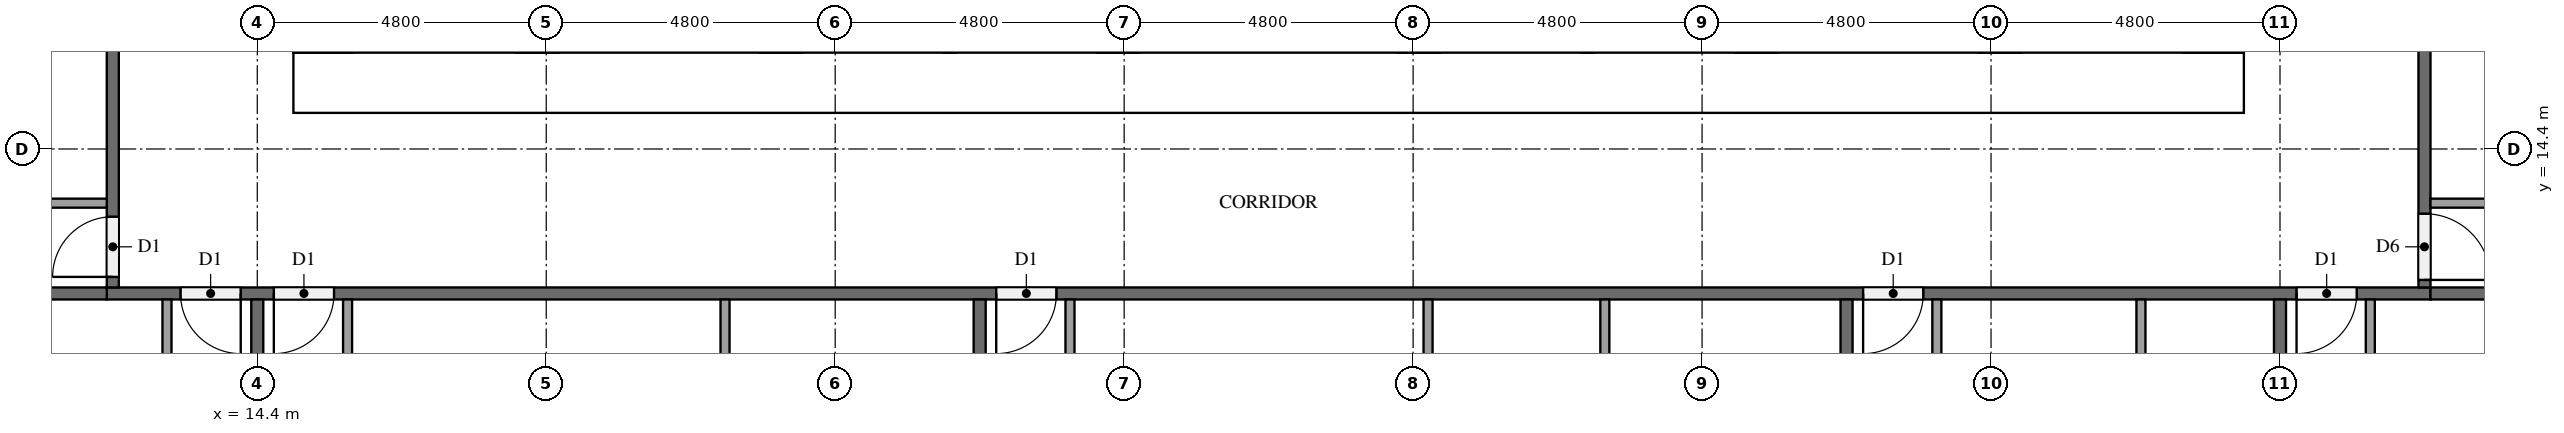
"""IFC4 building model, lengths in metres.
Left out: names, types, materials, properties, quantities, classifications, styles, units other than length and angle.
Written with IfcOpenShell. Run it as: python <this file> out.ifc"""

import sys

from ifc_helpers import new_model, si_unit, direction, frame, frame_2d, origin, place, context, subcontext, project, spatial, rectangle, extrude, element, fill, save


model = new_model("IFC4")
c1 = context("Model", 3, precision=1e-05, world=origin(), true_north=direction((0.0, 1.0)))
c2 = subcontext(c1, "Body", "Model", "MODEL_VIEW")
j1 = project(units=[si_unit("LENGTHUNIT", "METRE"), si_unit("PLANEANGLEUNIT", "RADIAN")], contexts=[c1])
p1 = place(None, origin())
s1 = spatial("IfcSite", under=j1, at=p1, CompositionType="ELEMENT")
p2 = place(p1, origin())
s2 = spatial("IfcBuilding", under=s1, at=p2, CompositionType="ELEMENT")
p3 = place(p2, frame((0.0, 0.0, 36.4)))
s3 = spatial("IfcBuildingStorey", under=s2, at=p3, CompositionType="ELEMENT", Elevation=36.4)
p4 = place(p3, frame((15.0, 15.5, 0.0), z_axis=(0.0, 0.0, 1.0), x_axis=(1.0, 0.0, 0.0)))
e1 = element("IfcWall", 1, at=p4, inside=s3, PredefinedType="SHEAR", context=c2, shape_type="SweptSolid", body=[
    extrude(rectangle(XDim=32.4, YDim=1.0, at=frame_2d((16.2, 0.0))), origin(), (0.0, 0.0, 1.0), 3.2),
])
p5 = place(p4, frame((15.3, 0.0, 0.0)))
e2 = element("IfcOpeningElement", 2, at=p5, cuts=e1, PredefinedType="OPENING", context=c2, shape_type="SweptSolid", body=[
    extrude(rectangle(XDim=1.8, YDim=2.1, at=frame_2d((0.9, 1.05))), frame((0.0, 0.51, 0.0), z_axis=(0.0, -1.0, 0.0), x_axis=(1.0, 0.0, 0.0)), (0.0, 0.0, 1.0), 1.02),
])
p6 = place(p3, frame((15.5, 16.0, 0.0), z_axis=(0.0, 0.0, 1.0), x_axis=(0.0, 1.0, 0.0)))
e3 = element("IfcWall", 3, at=p6, inside=s3, PredefinedType="SHEAR", context=c2, shape_type="SweptSolid", body=[
    extrude(rectangle(XDim=20.8, YDim=1.0, at=frame_2d((10.4, 0.0))), origin(), (0.0, 0.0, 1.0), 3.2),
])
p7 = place(p6, frame((4.76, 0.0, 0.0)))
e4 = element("IfcOpeningElement", 4, at=p7, cuts=e3, PredefinedType="OPENING", context=c2, shape_type="SweptSolid", body=[
    extrude(rectangle(XDim=1.2, YDim=2.1, at=frame_2d((0.6, 1.05))), frame((0.0, 0.51, 0.0), z_axis=(0.0, -1.0, 0.0), x_axis=(1.0, 0.0, 0.0)), (0.0, 0.0, 1.0), 1.02),
])
p8 = place(p3, frame((46.9, 16.0, 0.0), z_axis=(0.0, 0.0, 1.0), x_axis=(0.0, 1.0, 0.0)))
e5 = element("IfcWall", 5, at=p8, inside=s3, PredefinedType="SHEAR", context=c2, shape_type="SweptSolid", body=[
    extrude(rectangle(XDim=20.8, YDim=1.0, at=frame_2d((10.4, 0.0))), origin(), (0.0, 0.0, 1.0), 3.2),
])
p9 = place(p8, frame((10.1, 0.0, 0.0)))
e6 = element("IfcOpeningElement", 6, at=p9, cuts=e5, PredefinedType="OPENING", context=c2, shape_type="SweptSolid", body=[
    extrude(rectangle(XDim=1.2, YDim=2.1, at=frame_2d((0.6, 1.05))), frame((0.0, 0.51, 0.0), z_axis=(0.0, -1.0, 0.0), x_axis=(1.0, 0.0, 0.0)), (0.0, 0.0, 1.0), 1.02),
])
p10 = place(p3, frame((23.1, 16.0, 0.0), z_axis=(0.0, 0.0, 1.0), x_axis=(0.0, 1.0, 0.0)))
e7 = element("IfcWall", 7, at=p10, inside=s3, PredefinedType="SHEAR", context=c2, shape_type="SweptSolid", body=[
    extrude(rectangle(XDim=20.8, YDim=0.7, at=frame_2d((10.4, 0.0))), origin(), (0.0, 0.0, 1.0), 3.2),
])
p11 = place(p3, frame((50.5, 12.0, 0.0), z_axis=(0.0, 0.0, 1.0), x_axis=(-1.0, 0.0, 0.0)))
e8 = element("IfcWall", 8, at=p11, inside=s3, PredefinedType="PARTITIONING", context=c2, shape_type="SweptSolid", body=[
    extrude(rectangle(XDim=38.6, YDim=0.2, at=frame_2d((19.3, 0.0))), origin(), (0.0, 0.0, 1.0), 3.2),
])
p12 = place(p11, frame((36.375, 0.0, 0.0)))
e9 = element("IfcOpeningElement", 9, at=p12, cuts=e8, PredefinedType="OPENING", context=c2, shape_type="SweptSolid", body=[
    extrude(rectangle(XDim=1.0, YDim=2.1, at=frame_2d((0.5, 1.05))), frame((0.0, 0.11, 0.0), z_axis=(0.0, -1.0, 0.0), x_axis=(1.0, 0.0, 0.0)), (0.0, 0.0, 1.0), 0.22),
])
p13 = place(p11, frame((34.825, 0.0, 0.0)))
e10 = element("IfcOpeningElement", 10, at=p13, cuts=e8, PredefinedType="OPENING", context=c2, shape_type="SweptSolid", body=[
    extrude(rectangle(XDim=1.0, YDim=2.1, at=frame_2d((0.5, 1.05))), frame((0.0, 0.11, 0.0), z_axis=(0.0, -1.0, 0.0), x_axis=(1.0, 0.0, 0.0)), (0.0, 0.0, 1.0), 0.22),
])
p14 = place(p11, frame((22.825, 0.0, 0.0)))
e11 = element("IfcOpeningElement", 11, at=p14, cuts=e8, PredefinedType="OPENING", context=c2, shape_type="SweptSolid", body=[
    extrude(rectangle(XDim=1.0, YDim=2.1, at=frame_2d((0.5, 1.05))), frame((0.0, 0.11, 0.0), z_axis=(0.0, -1.0, 0.0), x_axis=(1.0, 0.0, 0.0)), (0.0, 0.0, 1.0), 0.22),
])
p15 = place(p11, frame((8.425, 0.0, 0.0)))
e12 = element("IfcOpeningElement", 12, at=p15, cuts=e8, PredefinedType="OPENING", context=c2, shape_type="SweptSolid", body=[
    extrude(rectangle(XDim=1.0, YDim=2.1, at=frame_2d((0.5, 1.05))), frame((0.0, 0.11, 0.0), z_axis=(0.0, -1.0, 0.0), x_axis=(1.0, 0.0, 0.0)), (0.0, 0.0, 1.0), 0.22),
])
p16 = place(p11, frame((1.225, 0.0, 0.0)))
e13 = element("IfcOpeningElement", 13, at=p16, cuts=e8, PredefinedType="OPENING", context=c2, shape_type="SweptSolid", body=[
    extrude(rectangle(XDim=1.0, YDim=2.1, at=frame_2d((0.5, 1.05))), frame((0.0, 0.11, 0.0), z_axis=(0.0, -1.0, 0.0), x_axis=(1.0, 0.0, 0.0)), (0.0, 0.0, 1.0), 0.22),
])
p17 = place(p3, frame((50.4, 40.7, 0.0), z_axis=(0.0, 0.0, 1.0), x_axis=(0.0, -1.0, 0.0)))
e14 = element("IfcWall", 14, at=p17, inside=s3, PredefinedType="PARTITIONING", context=c2, shape_type="SweptSolid", body=[
    extrude(rectangle(XDim=28.6, YDim=0.2, at=frame_2d((14.3, 0.0))), origin(), (0.0, 0.0, 1.0), 3.2),
])
p18 = place(p17, frame((27.375, 0.0, 0.0)))
e15 = element("IfcOpeningElement", 15, at=p18, cuts=e14, PredefinedType="OPENING", context=c2, shape_type="SweptSolid", body=[
    extrude(rectangle(XDim=1.1, YDim=2.1, at=frame_2d((0.55, 1.05))), frame((0.0, 0.11, 0.0), z_axis=(0.0, -1.0, 0.0), x_axis=(1.0, 0.0, 0.0)), (0.0, 0.0, 1.0), 0.22),
])
p19 = place(p17, frame((8.225, 0.0, 0.0)))
e16 = element("IfcOpeningElement", 16, at=p19, cuts=e14, PredefinedType="OPENING", context=c2, shape_type="SweptSolid", body=[
    extrude(rectangle(XDim=1.0, YDim=2.1, at=frame_2d((0.5, 1.05))), frame((0.0, 0.11, 0.0), z_axis=(0.0, -1.0, 0.0), x_axis=(1.0, 0.0, 0.0)), (0.0, 0.0, 1.0), 0.22),
])
p20 = place(p3, frame((12.0, 12.1, 0.0), z_axis=(0.0, 0.0, 1.0), x_axis=(0.0, 1.0, 0.0)))
e17 = element("IfcWall", 17, at=p20, inside=s3, PredefinedType="PARTITIONING", context=c2, shape_type="SweptSolid", body=[
    extrude(rectangle(XDim=28.6, YDim=0.2, at=frame_2d((14.3, 0.0))), origin(), (0.0, 0.0, 1.0), 3.2),
])
p21 = place(p20, frame((16.975, 0.0, 0.0)))
e18 = element("IfcOpeningElement", 18, at=p21, cuts=e17, PredefinedType="OPENING", context=c2, shape_type="SweptSolid", body=[
    extrude(rectangle(XDim=1.0, YDim=2.1, at=frame_2d((0.5, 1.05))), frame((0.0, 0.11, 0.0), z_axis=(0.0, -1.0, 0.0), x_axis=(1.0, 0.0, 0.0)), (0.0, 0.0, 1.0), 0.22),
])
p22 = place(p20, frame((0.175, 0.0, 0.0)))
e19 = element("IfcOpeningElement", 19, at=p22, cuts=e17, PredefinedType="OPENING", context=c2, shape_type="SweptSolid", body=[
    extrude(rectangle(XDim=1.0, YDim=2.1, at=frame_2d((0.5, 1.05))), frame((0.0, 0.11, 0.0), z_axis=(0.0, -1.0, 0.0), x_axis=(1.0, 0.0, 0.0)), (0.0, 0.0, 1.0), 0.22),
])
p23 = place(p3, frame((14.4, 11.9, 0.0), z_axis=(0.0, 0.0, 1.0), x_axis=(0.0, -1.0, 0.0)))
e20 = element("IfcWall", 20, at=p23, inside=s3, PredefinedType="PARTITIONING", context=c2, shape_type="SweptSolid", body=[
    extrude(rectangle(XDim=11.45, YDim=0.2, at=frame_2d((5.725, 0.0))), origin(), (0.0, 0.0, 1.0), 3.2),
])
for number, where, z_axis, x_axis in (
    (21, (0.1, 12.0, 0.0), (0.0, 0.0, 1.0), (1.0, 0.0, 0.0)),
    (22, (26.4, 11.9, 0.0), (0.0, 0.0, 1.0), (0.0, -1.0, 0.0)),
    (23, (40.8, 11.9, 0.0), (0.0, 0.0, 1.0), (0.0, -1.0, 0.0)),
    (24, (48.0, 11.9, 0.0), (0.0, 0.0, 1.0), (0.0, -1.0, 0.0)),
):
    element("IfcWall", number, at=place(p3, frame(where, z_axis=z_axis, x_axis=x_axis)), inside=s3, PredefinedType="PARTITIONING", context=c2, shape_type="SweptSolid", body=[
        extrude(rectangle(XDim=11.8, YDim=0.2, at=frame_2d((5.9, 0.0))), origin(), (0.0, 0.0, 1.0), 3.2),
    ])
p24 = place(p3, frame((50.5, 12.0, 0.0), z_axis=(0.0, 0.0, 1.0), x_axis=(1.0, 0.0, 0.0)))
e25 = element("IfcWall", 25, at=p24, inside=s3, PredefinedType="PARTITIONING", context=c2, shape_type="SweptSolid", body=[
    extrude(rectangle(XDim=7.0, YDim=0.2, at=frame_2d((3.5, 0.0))), origin(), (0.0, 0.0, 1.0), 3.2),
])
p25 = place(p3, frame((12.9, 11.9, 0.0), z_axis=(0.0, 0.0, 1.0), x_axis=(0.0, -1.0, 0.0)))
e26 = element("IfcWall", 26, at=p25, inside=s3, PredefinedType="PARTITIONING", context=c2, shape_type="SweptSolid", body=[
    extrude(rectangle(XDim=3.125, YDim=0.15, at=frame_2d((1.562, 0.0))), origin(), (0.0, 0.0, 1.0), 3.2),
])
p26 = place(p3, frame((22.17, 11.9, 0.0), z_axis=(0.0, 0.0, 1.0), x_axis=(0.0, -1.0, 0.0)))
e27 = element("IfcWall", 27, at=p26, inside=s3, PredefinedType="PARTITIONING", context=c2, shape_type="SweptSolid", body=[
    extrude(rectangle(XDim=3.725, YDim=0.15, at=frame_2d((1.862, 0.0))), origin(), (0.0, 0.0, 1.0), 3.2),
])
p27 = place(p3, frame((15.9, 11.9, 0.0), z_axis=(0.0, 0.0, 1.0), x_axis=(0.0, -1.0, 0.0)))
e28 = element("IfcWall", 28, at=p27, inside=s3, PredefinedType="PARTITIONING", context=c2, shape_type="SweptSolid", body=[
    extrude(rectangle(XDim=3.875, YDim=0.15, at=frame_2d((1.938, 0.0))), origin(), (0.0, 0.0, 1.0), 3.2),
])
for number, where, z_axis, x_axis in (
    (29, (33.848, 11.9, 0.0), (0.0, 0.0, 1.0), (0.0, -1.0, 0.0)),
    (30, (36.785, 11.9, 0.0), (0.0, 0.0, 1.0), (0.0, -1.0, 0.0)),
):
    element("IfcWall", number, at=place(p3, frame(where, z_axis=z_axis, x_axis=x_axis)), inside=s3, PredefinedType="PARTITIONING", context=c2, shape_type="SweptSolid", body=[
        extrude(rectangle(XDim=3.575, YDim=0.15, at=frame_2d((1.788, 0.0))), origin(), (0.0, 0.0, 1.0), 3.2),
    ])
p28 = place(p3, frame((27.9, 11.9, 0.0), z_axis=(0.0, 0.0, 1.0), x_axis=(0.0, -1.0, 0.0)))
e31 = element("IfcWall", 31, at=p28, inside=s3, PredefinedType="PARTITIONING", context=c2, shape_type="SweptSolid", body=[
    extrude(rectangle(XDim=3.725, YDim=0.15, at=frame_2d((1.862, 0.0))), origin(), (0.0, 0.0, 1.0), 3.2),
])
p29 = place(p3, frame((45.69, 11.9, 0.0), z_axis=(0.0, 0.0, 1.0), x_axis=(0.0, -1.0, 0.0)))
e32 = element("IfcWall", 32, at=p29, inside=s3, PredefinedType="PARTITIONING", context=c2, shape_type="SweptSolid", body=[
    extrude(rectangle(XDim=4.325, YDim=0.15, at=frame_2d((2.163, 0.0))), origin(), (0.0, 0.0, 1.0), 3.2),
])
p30 = place(p3, frame((42.3, 11.9, 0.0), z_axis=(0.0, 0.0, 1.0), x_axis=(0.0, -1.0, 0.0)))
e33 = element("IfcWall", 33, at=p30, inside=s3, PredefinedType="PARTITIONING", context=c2, shape_type="SweptSolid", body=[
    extrude(rectangle(XDim=4.475, YDim=0.15, at=frame_2d((2.237, 0.0))), origin(), (0.0, 0.0, 1.0), 3.2),
])
p31 = place(p3, frame((49.5, 11.9, 0.0), z_axis=(0.0, 0.0, 1.0), x_axis=(0.0, -1.0, 0.0)))
e34 = element("IfcWall", 34, at=p31, inside=s3, PredefinedType="PARTITIONING", context=c2, shape_type="SweptSolid", body=[
    extrude(rectangle(XDim=3.425, YDim=0.15, at=frame_2d((1.712, 0.0))), origin(), (0.0, 0.0, 1.0), 3.2),
])
p32 = place(p3, frame((50.5, 13.5, 0.0), z_axis=(0.0, 0.0, 1.0), x_axis=(1.0, 0.0, 0.0)))
e35 = element("IfcWall", 35, at=p32, inside=s3, PredefinedType="PARTITIONING", context=c2, shape_type="SweptSolid", body=[
    extrude(rectangle(XDim=1.925, YDim=0.15, at=frame_2d((0.962, 0.0))), origin(), (0.0, 0.0, 1.0), 3.2),
])
p33 = place(p3, frame((11.9, 13.5, 0.0), z_axis=(0.0, 0.0, 1.0), x_axis=(-1.0, 0.0, 0.0)))
e36 = element("IfcWall", 36, at=p33, inside=s3, PredefinedType="PARTITIONING", context=c2, shape_type="SweptSolid", body=[
    extrude(rectangle(XDim=4.625, YDim=0.15, at=frame_2d((2.312, 0.0))), origin(), (0.0, 0.0, 1.0), 3.2),
])
p34 = place(p5, frame((1.8, 0.0, 0.0), z_axis=(0.0, 0.0, 1.0), x_axis=(-1.0, 0.0, 0.0)))
e37 = element("IfcDoor", 37, at=p34, inside=s3, OperationType="DOUBLE_DOOR_SINGLE_SWING", PredefinedType="DOOR", context=c2, shape_type="SweptSolid", body=[
    extrude(rectangle(XDim=1.8, YDim=2.1, at=frame_2d((0.9, 1.05))), frame((0.0, 0.025, 0.0), z_axis=(0.0, -1.0, 0.0), x_axis=(1.0, 0.0, 0.0)), (0.0, 0.0, 1.0), 0.05),
])
fill(e2, e37)
p35 = place(p12, origin())
e38 = element("IfcDoor", 38, at=p35, inside=s3, OperationType="SINGLE_SWING_LEFT", PredefinedType="DOOR", context=c2, shape_type="SweptSolid", body=[
    extrude(rectangle(XDim=1.0, YDim=2.1, at=frame_2d((0.5, 1.05))), frame((0.0, 0.025, 0.0), z_axis=(0.0, -1.0, 0.0), x_axis=(1.0, 0.0, 0.0)), (0.0, 0.0, 1.0), 0.05),
])
fill(e9, e38)
p36 = place(p13, origin())
e39 = element("IfcDoor", 39, at=p36, inside=s3, OperationType="SINGLE_SWING_RIGHT", PredefinedType="DOOR", context=c2, shape_type="SweptSolid", body=[
    extrude(rectangle(XDim=1.0, YDim=2.1, at=frame_2d((0.5, 1.05))), frame((0.0, 0.025, 0.0), z_axis=(0.0, -1.0, 0.0), x_axis=(1.0, 0.0, 0.0)), (0.0, 0.0, 1.0), 0.05),
])
fill(e10, e39)
p37 = place(p14, origin())
e40 = element("IfcDoor", 40, at=p37, inside=s3, OperationType="SINGLE_SWING_RIGHT", PredefinedType="DOOR", context=c2, shape_type="SweptSolid", body=[
    extrude(rectangle(XDim=1.0, YDim=2.1, at=frame_2d((0.5, 1.05))), frame((0.0, 0.025, 0.0), z_axis=(0.0, -1.0, 0.0), x_axis=(1.0, 0.0, 0.0)), (0.0, 0.0, 1.0), 0.05),
])
fill(e11, e40)
p38 = place(p15, origin())
e41 = element("IfcDoor", 41, at=p38, inside=s3, OperationType="SINGLE_SWING_RIGHT", PredefinedType="DOOR", context=c2, shape_type="SweptSolid", body=[
    extrude(rectangle(XDim=1.0, YDim=2.1, at=frame_2d((0.5, 1.05))), frame((0.0, 0.025, 0.0), z_axis=(0.0, -1.0, 0.0), x_axis=(1.0, 0.0, 0.0)), (0.0, 0.0, 1.0), 0.05),
])
fill(e12, e41)
p39 = place(p16, origin())
e42 = element("IfcDoor", 42, at=p39, inside=s3, OperationType="SINGLE_SWING_RIGHT", PredefinedType="DOOR", context=c2, shape_type="SweptSolid", body=[
    extrude(rectangle(XDim=1.0, YDim=2.1, at=frame_2d((0.5, 1.05))), frame((0.0, 0.025, 0.0), z_axis=(0.0, -1.0, 0.0), x_axis=(1.0, 0.0, 0.0)), (0.0, 0.0, 1.0), 0.05),
])
fill(e13, e42)
p40 = place(p18, origin())
e43 = element("IfcDoor", 43, at=p40, inside=s3, OperationType="SINGLE_SWING_RIGHT", PredefinedType="DOOR", context=c2, shape_type="SweptSolid", body=[
    extrude(rectangle(XDim=1.1, YDim=2.1, at=frame_2d((0.55, 1.05))), frame((0.0, 0.025, 0.0), z_axis=(0.0, -1.0, 0.0), x_axis=(1.0, 0.0, 0.0)), (0.0, 0.0, 1.0), 0.05),
])
fill(e15, e43)
p41 = place(p22, origin())
e44 = element("IfcDoor", 44, at=p41, inside=s3, OperationType="SINGLE_SWING_LEFT", PredefinedType="DOOR", context=c2, shape_type="SweptSolid", body=[
    extrude(rectangle(XDim=1.0, YDim=2.1, at=frame_2d((0.5, 1.05))), frame((0.0, 0.025, 0.0), z_axis=(0.0, -1.0, 0.0), x_axis=(1.0, 0.0, 0.0)), (0.0, 0.0, 1.0), 0.05),
])
fill(e19, e44)
save(model, sys.argv[1])
